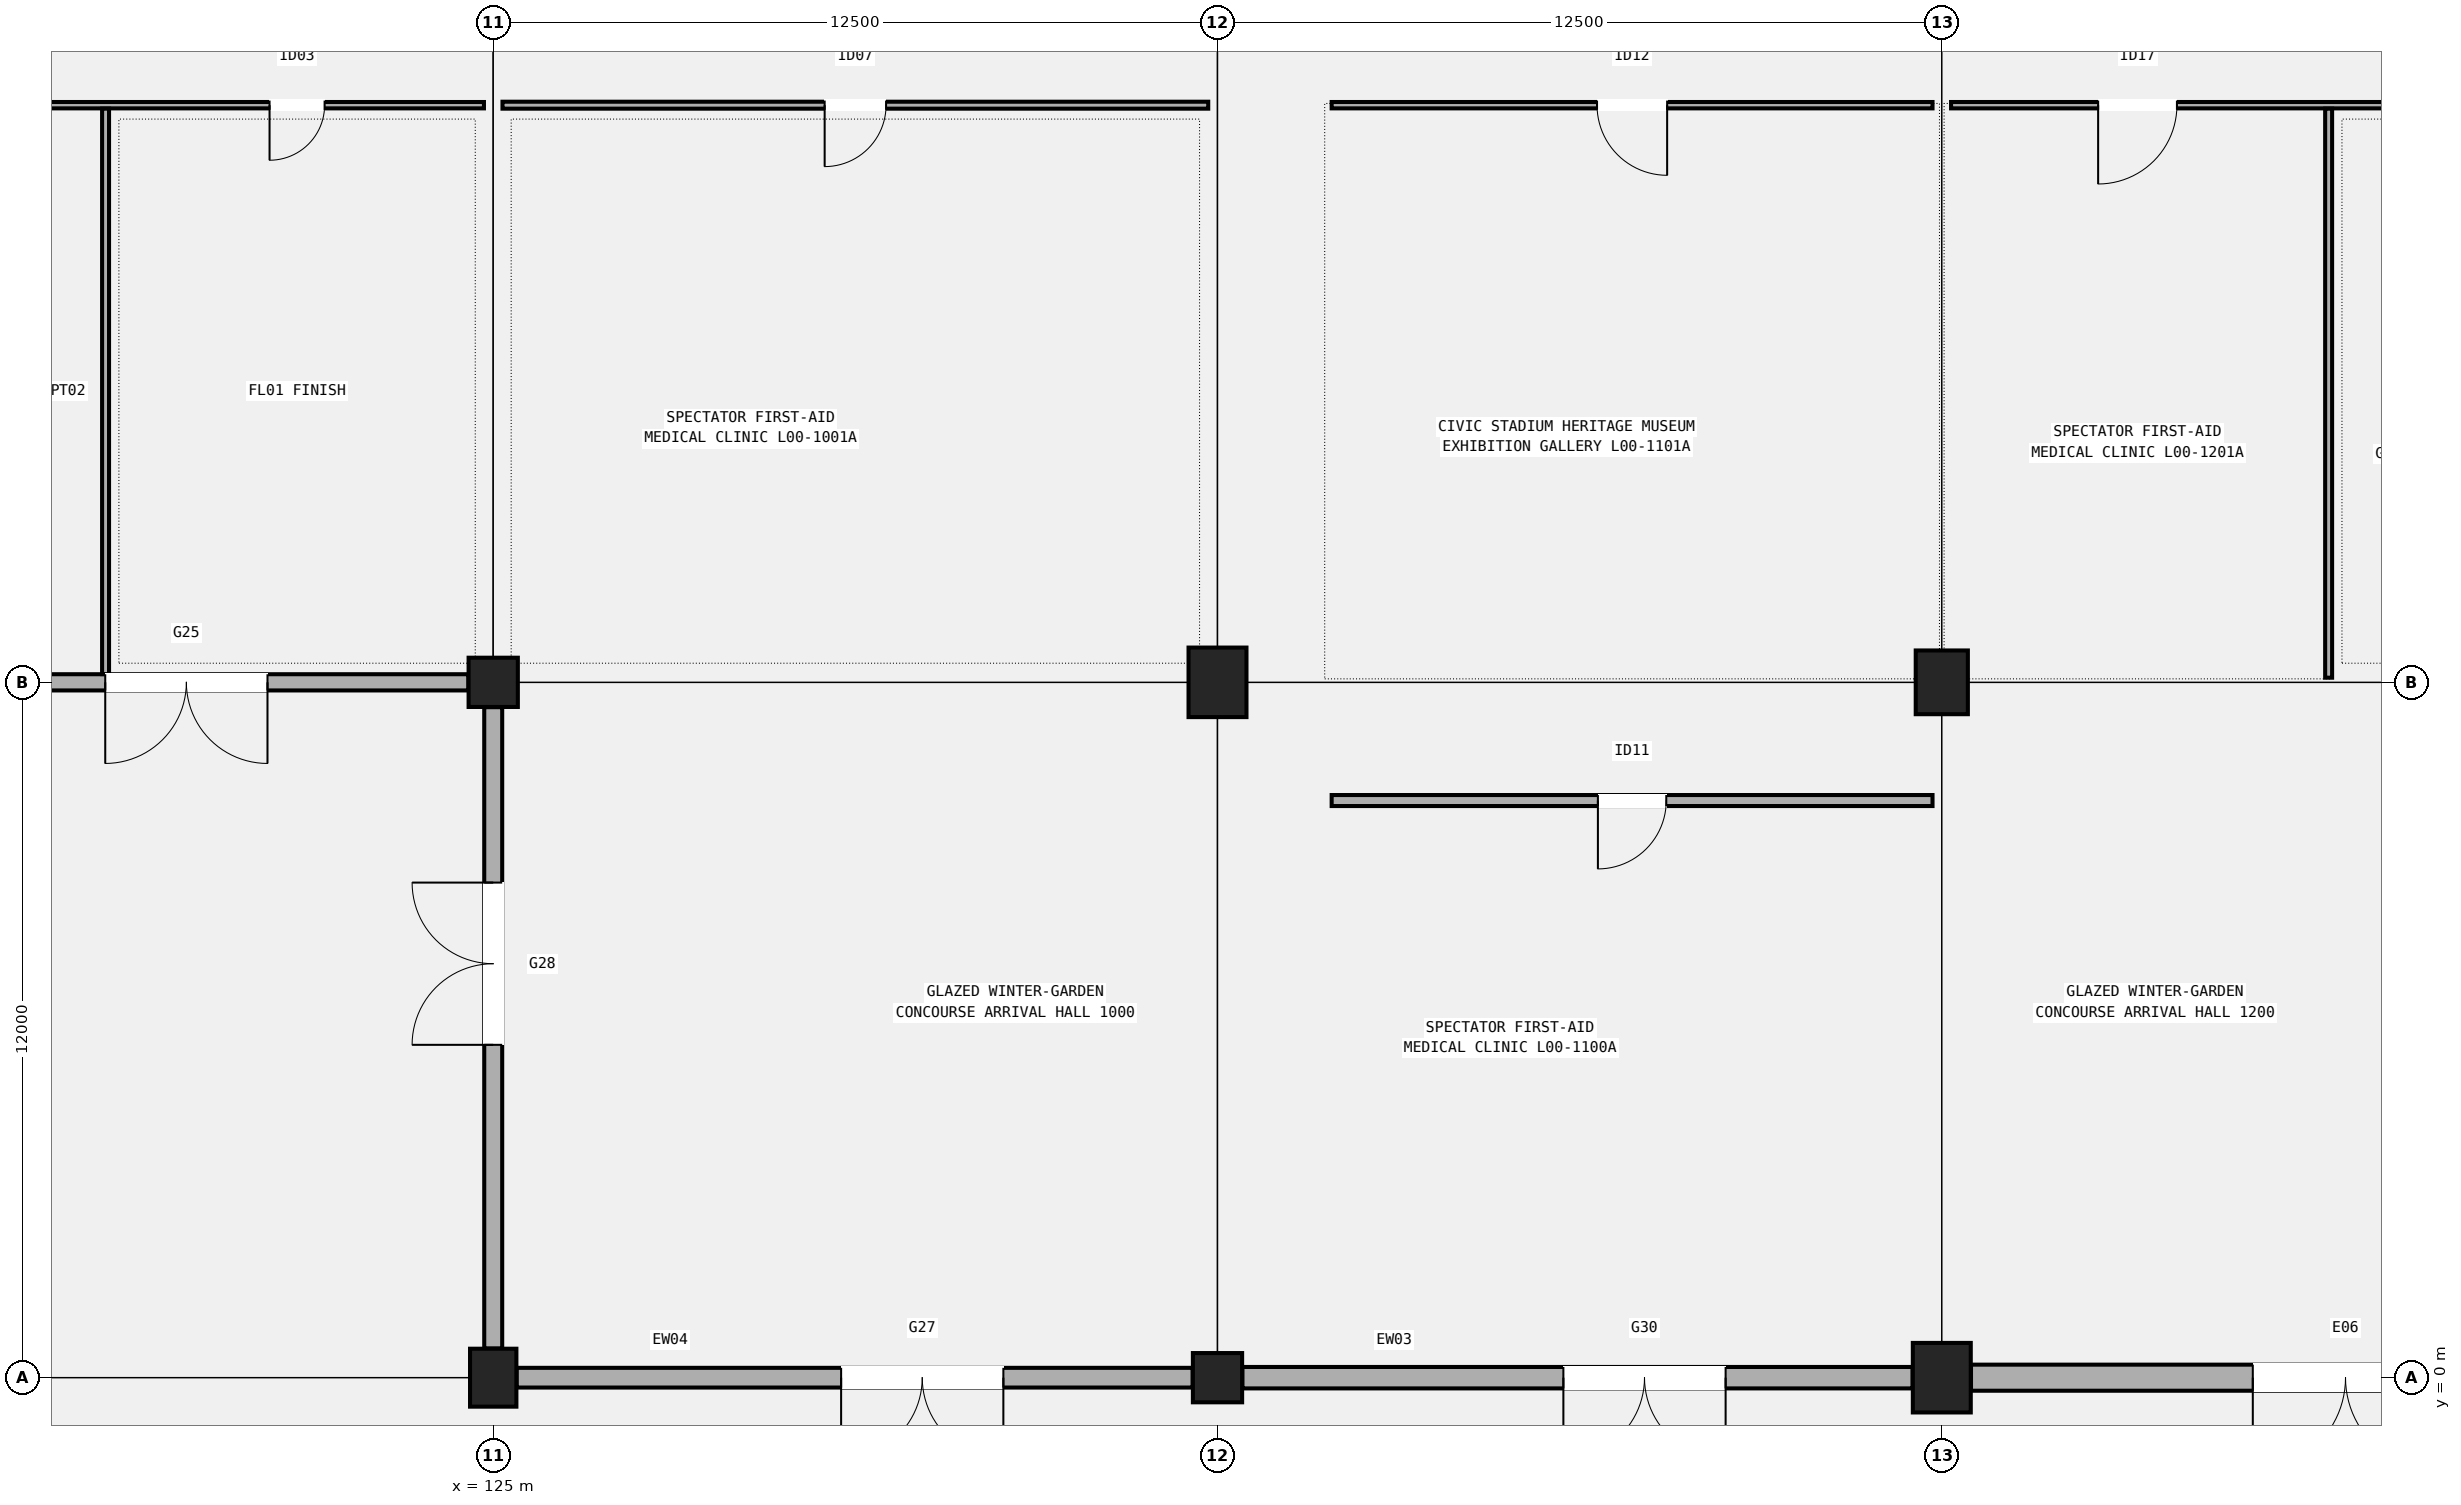
"""IFC4 building model, lengths in metres.
Left out: names, types, materials, properties, quantities, classifications, styles, units other than length and angle.
Written with IfcOpenShell. Run it as: python <this file> out.ifc"""

import sys

from ifc_helpers import new_model, si_unit, direction, frame, frame_2d, origin, origin_2d, place, context, subcontext, project, spatial, rectangle, circle, extrude, element, fill, save


model = new_model("IFC4")
c1 = context("Model", 3, precision=1e-05, world=origin(), true_north=direction((0.0, 1.0)))
c2 = subcontext(c1, "Body", "Model", "MODEL_VIEW")
j1 = project(units=[si_unit("LENGTHUNIT", "METRE"), si_unit("PLANEANGLEUNIT", "RADIAN")], contexts=[c1])
p1 = place(None, origin())
s1 = spatial("IfcSite", under=j1, at=p1, CompositionType="ELEMENT")
p2 = place(p1, origin())
s2 = spatial("IfcBuilding", under=s1, at=p2, CompositionType="ELEMENT")
p3 = place(p2, origin())
s3 = spatial("IfcBuildingStorey", under=s2, at=p3, CompositionType="ELEMENT", Elevation=0.0)
p4 = place(p3, frame((125.0, 0.0, 0.0), z_axis=(0.0, 0.0, 1.0), x_axis=(1.0, 0.0, 0.0)))
e1 = element("IfcColumn", 1, at=p4, inside=s3, PredefinedType="COLUMN", context=c2, shape_type="SweptSolid", body=[
    extrude(rectangle(XDim=0.8, YDim=1.0, at=origin_2d()), origin(), (0.0, 0.0, 1.0), 5.4),
])
for number, where, z_axis, x_axis in (
    (2, (125.0, 12.0, 0.0), (0.0, 0.0, 1.0), (1.0, 0.0, 0.0)),
    (3, (137.5, 0.0, 0.0), (0.0, 0.0, 1.0), (1.0, 0.0, 0.0)),
):
    element("IfcColumn", number, at=place(p3, frame(where, z_axis=z_axis, x_axis=x_axis)), inside=s3, PredefinedType="COLUMN", context=c2, shape_type="SweptSolid", body=[
        extrude(circle(Radius=0.425, at=origin_2d()), origin(), (0.0, 0.0, 1.0), 5.4),
    ])
for number, where, z_axis, x_axis in (
    (4, (137.5, 12.0, 0.0), (0.0, 0.0, 1.0), (1.0, 0.0, 0.0)),
    (5, (150.0, 0.0, 0.0), (0.0, 0.0, 1.0), (1.0, 0.0, 0.0)),
):
    element("IfcColumn", number, at=place(p3, frame(where, z_axis=z_axis, x_axis=x_axis)), inside=s3, PredefinedType="COLUMN", context=c2, shape_type="SweptSolid", body=[
        extrude(rectangle(XDim=1.0, YDim=1.2, at=origin_2d()), origin(), (0.0, 0.0, 1.0), 5.4),
    ])
p5 = place(p3, frame((150.0, 12.0, 0.0), z_axis=(0.0, 0.0, 1.0), x_axis=(1.0, 0.0, 0.0)))
e6 = element("IfcColumn", 6, at=p5, inside=s3, PredefinedType="COLUMN", context=c2, shape_type="SweptSolid", body=[
    extrude(rectangle(XDim=0.9, YDim=1.1, at=origin_2d()), origin(), (0.0, 0.0, 1.0), 5.4),
])
p6 = place(p3, frame((112.404, 12.0, 0.0), z_axis=(0.0, 0.0, 1.0), x_axis=(1.0, 0.0, 0.0)))
e7 = element("IfcWall", 7, at=p6, inside=s3, PredefinedType="SOLIDWALL", context=c2, shape_type="SweptSolid", body=[
    extrude(rectangle(XDim=12.167, YDim=0.28, at=frame_2d((6.083, 0.0))), origin(), (0.0, 0.0, 1.0), 4.24),
])
p7 = place(p6, frame((8.7, 0.0, 0.0), z_axis=(0.0, 0.0, 1.0), x_axis=(-1.0, 0.0, 0.0)))
e8 = element("IfcOpeningElement", 8, at=p7, cuts=e7, PredefinedType="OPENING", context=c2, shape_type="SweptSolid", body=[
    extrude(rectangle(XDim=2.8, YDim=2.4, at=frame_2d((1.4, 1.2))), frame((0.0, 0.15, 0.0), z_axis=(0.0, -1.0, 0.0), x_axis=(1.0, 0.0, 0.0)), (0.0, 0.0, 1.0), 0.3),
])
p8 = place(p3, frame((125.404, 0.0, 0.0), z_axis=(0.0, 0.0, 1.0), x_axis=(1.0, 0.0, 0.0)))
e9 = element("IfcWall", 9, at=p8, inside=s3, PredefinedType="SOLIDWALL", context=c2, shape_type="SweptSolid", body=[
    extrude(rectangle(XDim=11.667, YDim=0.34, at=frame_2d((5.833, 0.0))), origin(), (0.0, 0.0, 1.0), 4.24),
])
p9 = place(p8, frame((8.4, 0.0, 0.0), z_axis=(0.0, 0.0, 1.0), x_axis=(-1.0, 0.0, 0.0)))
e10 = element("IfcOpeningElement", 10, at=p9, cuts=e9, PredefinedType="OPENING", context=c2, shape_type="SweptSolid", body=[
    extrude(rectangle(XDim=2.8, YDim=2.4, at=frame_2d((1.4, 1.2))), frame((0.0, 0.18, 0.0), z_axis=(0.0, -1.0, 0.0), x_axis=(1.0, 0.0, 0.0)), (0.0, 0.0, 1.0), 0.36),
])
p10 = place(p3, frame((125.0, 0.504, 0.0), z_axis=(0.0, 0.0, 1.0), x_axis=(0.0, 1.0, 0.0)))
e11 = element("IfcWall", 11, at=p10, inside=s3, PredefinedType="SOLIDWALL", context=c2, shape_type="SweptSolid", body=[
    extrude(rectangle(XDim=11.067, YDim=0.31, at=frame_2d((5.534, 0.0))), origin(), (0.0, 0.0, 1.0), 4.34),
])
p11 = place(p10, frame((5.24, 0.0, 0.0)))
e12 = element("IfcOpeningElement", 12, at=p11, cuts=e11, PredefinedType="OPENING", context=c2, shape_type="SweptSolid", body=[
    extrude(rectangle(XDim=2.8, YDim=2.4, at=frame_2d((1.4, 1.2))), frame((0.0, 0.165, 0.0), z_axis=(0.0, -1.0, 0.0), x_axis=(1.0, 0.0, 0.0)), (0.0, 0.0, 1.0), 0.33),
])
p12 = place(p3, frame((137.929, 0.0, 0.0), z_axis=(0.0, 0.0, 1.0), x_axis=(1.0, 0.0, 0.0)))
e13 = element("IfcWall", 13, at=p12, inside=s3, PredefinedType="SOLIDWALL", context=c2, shape_type="SweptSolid", body=[
    extrude(rectangle(XDim=11.567, YDim=0.37, at=frame_2d((5.784, 0.0))), origin(), (0.0, 0.0, 1.0), 4.34),
])
p13 = place(p12, frame((8.34, 0.0, 0.0), z_axis=(0.0, 0.0, 1.0), x_axis=(-1.0, 0.0, 0.0)))
e14 = element("IfcOpeningElement", 14, at=p13, cuts=e13, PredefinedType="OPENING", context=c2, shape_type="SweptSolid", body=[
    extrude(rectangle(XDim=2.8, YDim=2.4, at=frame_2d((1.4, 1.2))), frame((0.0, 0.195, 0.0), z_axis=(0.0, -1.0, 0.0), x_axis=(1.0, 0.0, 0.0)), (0.0, 0.0, 1.0), 0.39),
])
p14 = place(p3, frame((150.504, 0.0, 0.0), z_axis=(0.0, 0.0, 1.0), x_axis=(1.0, 0.0, 0.0)))
e15 = element("IfcWall", 15, at=p14, inside=s3, PredefinedType="SOLIDWALL", context=c2, shape_type="SweptSolid", body=[
    extrude(rectangle(XDim=11.542, YDim=0.45, at=frame_2d((5.771, 0.0))), origin(), (0.0, 0.0, 1.0), 4.09),
])
p15 = place(p14, frame((8.063, 0.0, 0.0), z_axis=(0.0, 0.0, 1.0), x_axis=(-1.0, 0.0, 0.0)))
e16 = element("IfcOpeningElement", 16, at=p15, cuts=e15, PredefinedType="OPENING", context=c2, shape_type="SweptSolid", body=[
    extrude(rectangle(XDim=3.2, YDim=2.6, at=frame_2d((1.6, 1.3))), frame((0.0, 0.235, 0.0), z_axis=(0.0, -1.0, 0.0), x_axis=(1.0, 0.0, 0.0)), (0.0, 0.0, 1.0), 0.47),
])
p16 = place(p3, frame((112.16, 21.96, 0.0), z_axis=(0.0, 0.0, 1.0), x_axis=(1.0, 0.0, 0.0)))
e17 = element("IfcWall", 17, at=p16, inside=s3, PredefinedType="PARTITIONING", context=c2, shape_type="SweptSolid", body=[
    extrude(rectangle(XDim=12.68, YDim=0.11, at=frame_2d((6.34, 0.0))), origin(), (0.0, 0.0, 1.0), 4.52),
])
p17 = place(p16, frame((3.495, 0.0, 0.0), z_axis=(0.0, 0.0, 1.0), x_axis=(-1.0, 0.0, 0.0)))
e18 = element("IfcOpeningElement", 18, at=p17, cuts=e17, PredefinedType="OPENING", context=c2, shape_type="SweptSolid", body=[
    extrude(rectangle(XDim=0.92, YDim=2.1, at=frame_2d((0.46, 1.05))), frame((0.0, 0.065, 0.0), z_axis=(0.0, -1.0, 0.0), x_axis=(1.0, 0.0, 0.0)), (0.0, 0.0, 1.0), 0.13),
])
p18 = place(p16, frame((9.93, 0.0, 0.0), z_axis=(0.0, 0.0, 1.0), x_axis=(-1.0, 0.0, 0.0)))
e19 = element("IfcOpeningElement", 19, at=p18, cuts=e17, PredefinedType="OPENING", context=c2, shape_type="SweptSolid", body=[
    extrude(rectangle(XDim=0.95, YDim=2.12, at=frame_2d((0.475, 1.06))), frame((0.0, 0.065, 0.0), z_axis=(0.0, -1.0, 0.0), x_axis=(1.0, 0.0, 0.0)), (0.0, 0.0, 1.0), 0.13),
])
p19 = place(p3, frame((118.31, 12.142, 0.0), z_axis=(0.0, 0.0, 1.0), x_axis=(0.0, 1.0, 0.0)))
e20 = element("IfcWall", 20, at=p19, inside=s3, PredefinedType="PARTITIONING", context=c2, shape_type="SweptSolid", body=[
    extrude(rectangle(XDim=9.758, YDim=0.12, at=frame_2d((4.879, 0.0))), origin(), (0.0, 0.0, 1.0), 4.52),
])
p20 = place(p3, frame((125.16, 21.96, 0.0), z_axis=(0.0, 0.0, 1.0), x_axis=(1.0, 0.0, 0.0)))
e21 = element("IfcWall", 21, at=p20, inside=s3, PredefinedType="PARTITIONING", context=c2, shape_type="SweptSolid", body=[
    extrude(rectangle(XDim=12.18, YDim=0.12, at=frame_2d((6.09, 0.0))), origin(), (0.0, 0.0, 1.0), 4.52),
])
p21 = place(p20, frame((6.62, 0.0, 0.0), z_axis=(0.0, 0.0, 1.0), x_axis=(-1.0, 0.0, 0.0)))
e22 = element("IfcOpeningElement", 22, at=p21, cuts=e21, PredefinedType="OPENING", context=c2, shape_type="SweptSolid", body=[
    extrude(rectangle(XDim=1.06, YDim=2.15, at=frame_2d((0.53, 1.075))), frame((0.0, 0.07, 0.0), z_axis=(0.0, -1.0, 0.0), x_axis=(1.0, 0.0, 0.0)), (0.0, 0.0, 1.0), 0.14),
])
p22 = place(p3, frame((139.47, 9.96, 0.0), z_axis=(0.0, 0.0, 1.0), x_axis=(1.0, 0.0, 0.0)))
e23 = element("IfcWall", 23, at=p22, inside=s3, PredefinedType="PARTITIONING", context=c2, shape_type="SweptSolid", body=[
    extrude(rectangle(XDim=10.37, YDim=0.19, at=frame_2d((5.185, 0.0))), origin(), (0.0, 0.0, 1.0), 4.52),
])
p23 = place(p22, frame((5.775, 0.0, 0.0), z_axis=(0.0, 0.0, 1.0), x_axis=(-1.0, 0.0, 0.0)))
e24 = element("IfcOpeningElement", 24, at=p23, cuts=e23, PredefinedType="OPENING", context=c2, shape_type="SweptSolid", body=[
    extrude(rectangle(XDim=1.18, YDim=2.2, at=frame_2d((0.59, 1.1))), frame((0.0, 0.105, 0.0), z_axis=(0.0, -1.0, 0.0), x_axis=(1.0, 0.0, 0.0)), (0.0, 0.0, 1.0), 0.21),
])
p24 = place(p3, frame((139.47, 21.96, 0.0), z_axis=(0.0, 0.0, 1.0), x_axis=(1.0, 0.0, 0.0)))
e25 = element("IfcWall", 25, at=p24, inside=s3, PredefinedType="PARTITIONING", context=c2, shape_type="SweptSolid", body=[
    extrude(rectangle(XDim=10.37, YDim=0.11, at=frame_2d((5.185, 0.0))), origin(), (0.0, 0.0, 1.0), 4.52),
])
p25 = place(p24, frame((5.79, 0.0, 0.0), z_axis=(0.0, 0.0, 1.0), x_axis=(-1.0, 0.0, 0.0)))
e26 = element("IfcOpeningElement", 26, at=p25, cuts=e25, PredefinedType="OPENING", context=c2, shape_type="SweptSolid", body=[
    extrude(rectangle(XDim=1.21, YDim=2.18, at=frame_2d((0.605, 1.09))), frame((0.0, 0.065, 0.0), z_axis=(0.0, -1.0, 0.0), x_axis=(1.0, 0.0, 0.0)), (0.0, 0.0, 1.0), 0.13),
])
p26 = place(p3, frame((150.16, 21.96, 0.0), z_axis=(0.0, 0.0, 1.0), x_axis=(1.0, 0.0, 0.0)))
e27 = element("IfcWall", 27, at=p26, inside=s3, PredefinedType="PARTITIONING", context=c2, shape_type="SweptSolid", body=[
    extrude(rectangle(XDim=12.18, YDim=0.11, at=frame_2d((6.09, 0.0))), origin(), (0.0, 0.0, 1.0), 4.52),
])
p27 = place(p26, frame((3.898, 0.0, 0.0), z_axis=(0.0, 0.0, 1.0), x_axis=(-1.0, 0.0, 0.0)))
e28 = element("IfcOpeningElement", 28, at=p27, cuts=e27, PredefinedType="OPENING", context=c2, shape_type="SweptSolid", body=[
    extrude(rectangle(XDim=1.36, YDim=2.25, at=frame_2d((0.68, 1.125))), frame((0.0, 0.065, 0.0), z_axis=(0.0, -1.0, 0.0), x_axis=(1.0, 0.0, 0.0)), (0.0, 0.0, 1.0), 0.13),
])
p28 = place(p26, frame((10.088, 0.0, 0.0), z_axis=(0.0, 0.0, 1.0), x_axis=(-1.0, 0.0, 0.0)))
e29 = element("IfcOpeningElement", 29, at=p28, cuts=e27, PredefinedType="OPENING", context=c2, shape_type="SweptSolid", body=[
    extrude(rectangle(XDim=1.4, YDim=2.24, at=frame_2d((0.7, 1.12))), frame((0.0, 0.065, 0.0), z_axis=(0.0, -1.0, 0.0), x_axis=(1.0, 0.0, 0.0)), (0.0, 0.0, 1.0), 0.13),
])
p29 = place(p3, frame((156.676, 12.08, 0.0), z_axis=(0.0, 0.0, 1.0), x_axis=(0.0, 1.0, 0.0)))
e30 = element("IfcWall", 30, at=p29, inside=s3, PredefinedType="PARTITIONING", context=c2, shape_type="SweptSolid", body=[
    extrude(rectangle(XDim=9.82, YDim=0.12, at=frame_2d((4.91, 0.0))), origin(), (0.0, 0.0, 1.0), 4.52),
])
p30 = place(p7, origin())
e31 = element("IfcDoor", 31, at=p30, inside=s3, OperationType="DOUBLE_DOOR_SINGLE_SWING", PredefinedType="DOOR", context=c2, shape_type="SweptSolid", body=[
    extrude(rectangle(XDim=2.8, YDim=2.4, at=frame_2d((1.4, 1.2))), frame((0.0, 0.025, 0.0), z_axis=(0.0, -1.0, 0.0), x_axis=(1.0, 0.0, 0.0)), (0.0, 0.0, 1.0), 0.05),
])
fill(e8, e31)
p31 = place(p9, origin())
e32 = element("IfcDoor", 32, at=p31, inside=s3, OperationType="DOUBLE_DOOR_SINGLE_SWING", PredefinedType="DOOR", context=c2, shape_type="SweptSolid", body=[
    extrude(rectangle(XDim=2.8, YDim=2.4, at=frame_2d((1.4, 1.2))), frame((0.0, 0.025, 0.0), z_axis=(0.0, -1.0, 0.0), x_axis=(1.0, 0.0, 0.0)), (0.0, 0.0, 1.0), 0.05),
])
fill(e10, e32)
p32 = place(p11, origin())
e33 = element("IfcDoor", 33, at=p32, inside=s3, OperationType="DOUBLE_DOOR_SINGLE_SWING", PredefinedType="DOOR", context=c2, shape_type="SweptSolid", body=[
    extrude(rectangle(XDim=2.8, YDim=2.4, at=frame_2d((1.4, 1.2))), frame((0.0, 0.025, 0.0), z_axis=(0.0, -1.0, 0.0), x_axis=(1.0, 0.0, 0.0)), (0.0, 0.0, 1.0), 0.05),
])
fill(e12, e33)
p33 = place(p13, origin())
e34 = element("IfcDoor", 34, at=p33, inside=s3, OperationType="DOUBLE_DOOR_SINGLE_SWING", PredefinedType="DOOR", context=c2, shape_type="SweptSolid", body=[
    extrude(rectangle(XDim=2.8, YDim=2.4, at=frame_2d((1.4, 1.2))), frame((0.0, 0.025, 0.0), z_axis=(0.0, -1.0, 0.0), x_axis=(1.0, 0.0, 0.0)), (0.0, 0.0, 1.0), 0.05),
])
fill(e14, e34)
p34 = place(p15, origin())
e35 = element("IfcDoor", 35, at=p34, inside=s3, OperationType="DOUBLE_DOOR_SINGLE_SWING", PredefinedType="DOOR", context=c2, shape_type="SweptSolid", body=[
    extrude(rectangle(XDim=3.2, YDim=2.6, at=frame_2d((1.6, 1.3))), frame((0.0, 0.025, 0.0), z_axis=(0.0, -1.0, 0.0), x_axis=(1.0, 0.0, 0.0)), (0.0, 0.0, 1.0), 0.05),
])
fill(e16, e35)
p35 = place(p18, origin())
e36 = element("IfcDoor", 36, at=p35, inside=s3, OperationType="SINGLE_SWING_RIGHT", PredefinedType="DOOR", context=c2, shape_type="SweptSolid", body=[
    extrude(rectangle(XDim=0.95, YDim=2.12, at=frame_2d((0.475, 1.06))), frame((0.0, 0.025, 0.0), z_axis=(0.0, -1.0, 0.0), x_axis=(1.0, 0.0, 0.0)), (0.0, 0.0, 1.0), 0.05),
])
fill(e19, e36)
p36 = place(p21, origin())
e37 = element("IfcDoor", 37, at=p36, inside=s3, OperationType="SINGLE_SWING_RIGHT", PredefinedType="DOOR", context=c2, shape_type="SweptSolid", body=[
    extrude(rectangle(XDim=1.06, YDim=2.15, at=frame_2d((0.53, 1.075))), frame((0.0, 0.025, 0.0), z_axis=(0.0, -1.0, 0.0), x_axis=(1.0, 0.0, 0.0)), (0.0, 0.0, 1.0), 0.05),
])
fill(e22, e37)
p37 = place(p23, origin())
e38 = element("IfcDoor", 38, at=p37, inside=s3, OperationType="SINGLE_SWING_RIGHT", PredefinedType="DOOR", context=c2, shape_type="SweptSolid", body=[
    extrude(rectangle(XDim=1.18, YDim=2.2, at=frame_2d((0.59, 1.1))), frame((0.0, 0.025, 0.0), z_axis=(0.0, -1.0, 0.0), x_axis=(1.0, 0.0, 0.0)), (0.0, 0.0, 1.0), 0.05),
])
fill(e24, e38)
p38 = place(p25, origin())
e39 = element("IfcDoor", 39, at=p38, inside=s3, OperationType="SINGLE_SWING_LEFT", PredefinedType="DOOR", context=c2, shape_type="SweptSolid", body=[
    extrude(rectangle(XDim=1.21, YDim=2.18, at=frame_2d((0.605, 1.09))), frame((0.0, 0.025, 0.0), z_axis=(0.0, -1.0, 0.0), x_axis=(1.0, 0.0, 0.0)), (0.0, 0.0, 1.0), 0.05),
])
fill(e26, e39)
p39 = place(p27, origin())
e40 = element("IfcDoor", 40, at=p39, inside=s3, OperationType="SINGLE_SWING_RIGHT", PredefinedType="DOOR", context=c2, shape_type="SweptSolid", body=[
    extrude(rectangle(XDim=1.36, YDim=2.25, at=frame_2d((0.68, 1.125))), frame((0.0, 0.025, 0.0), z_axis=(0.0, -1.0, 0.0), x_axis=(1.0, 0.0, 0.0)), (0.0, 0.0, 1.0), 0.05),
])
fill(e28, e40)
save(model, sys.argv[1])
